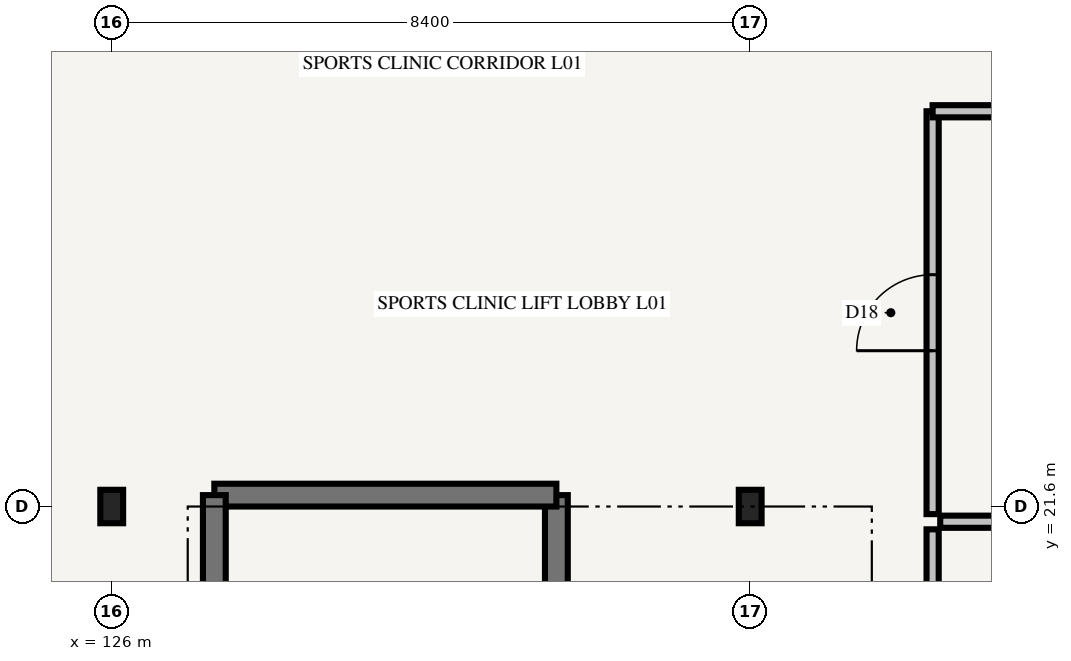
"""IFC4 building model, lengths in metres.
Left out: names, types, materials, properties, quantities, classifications, styles, units other than length and angle.
Written with IfcOpenShell. Run it as: python <this file> out.ifc"""

import sys

from ifc_helpers import new_model, si_unit, direction, frame, frame_2d, origin, origin_2d, place, context, subcontext, project, spatial, rectangle, i_section, extrude, element, fill, save


model = new_model("IFC4")
c1 = context("Model", 3, precision=1e-05, world=origin(), true_north=direction((0.0, 1.0)))
c2 = subcontext(c1, "Body", "Model", "MODEL_VIEW")
j1 = project(units=[si_unit("LENGTHUNIT", "METRE"), si_unit("PLANEANGLEUNIT", "RADIAN")], contexts=[c1])
p1 = place(None, origin())
s1 = spatial("IfcSite", under=j1, at=p1, CompositionType="ELEMENT")
p2 = place(p1, origin())
s2 = spatial("IfcBuilding", under=s1, at=p2, CompositionType="ELEMENT")
p3 = place(p2, frame((0.0, 0.0, 4.5)))
s3 = spatial("IfcBuildingStorey", under=s2, at=p3, CompositionType="ELEMENT", Elevation=4.5)
for number, where, z_axis, x_axis in (
    (1, (126.0, 21.6, 0.0), (0.0, 0.0, 1.0), (1.0, 0.0, 0.0)),
    (2, (134.4, 21.6, 0.0), (0.0, 0.0, 1.0), (1.0, 0.0, 0.0)),
):
    element("IfcColumn", number, at=place(p3, frame(where, z_axis=z_axis, x_axis=x_axis)), inside=s3, PredefinedType="COLUMN", context=c2, shape_type="SweptSolid", body=[
        extrude(i_section(OverallWidth=0.3, OverallDepth=0.44, WebThickness=0.011, FlangeThickness=0.021, FilletRadius=0.027, at=origin_2d()), origin(), (0.0, 0.0, 1.0), 4.2),
    ])
p4 = place(p3, frame((131.85, 14.65, 0.0), z_axis=(0.0, 0.0, 1.0), x_axis=(0.0, 1.0, 0.0)))
e3 = element("IfcWall", 3, at=p4, inside=s3, PredefinedType="SHEAR", context=c2, shape_type="SweptSolid", body=[
    extrude(rectangle(XDim=7.1, YDim=0.3, at=frame_2d((3.55, 0.0))), origin(), (0.0, 0.0, 1.0), 4.0),
])
p5 = place(p3, frame((131.85, 21.75, 0.0), z_axis=(0.0, 0.0, 1.0), x_axis=(-1.0, 0.0, 0.0)))
e4 = element("IfcWall", 4, at=p5, inside=s3, PredefinedType="SHEAR", context=c2, shape_type="SweptSolid", body=[
    extrude(rectangle(XDim=4.5, YDim=0.3, at=frame_2d((2.25, 0.0))), origin(), (0.0, 0.0, 1.0), 4.0),
])
p6 = place(p3, frame((127.35, 21.75, 0.0), z_axis=(0.0, 0.0, 1.0), x_axis=(0.0, -1.0, 0.0)))
e5 = element("IfcWall", 5, at=p6, inside=s3, PredefinedType="SHEAR", context=c2, shape_type="SweptSolid", body=[
    extrude(rectangle(XDim=7.1, YDim=0.3, at=frame_2d((3.55, 0.0))), origin(), (0.0, 0.0, 1.0), 4.0),
])
p7 = place(p3, frame((136.8, 14.5, 0.0), z_axis=(0.0, 0.0, 1.0), x_axis=(0.0, 1.0, 0.0)))
e6 = element("IfcWall", 6, at=p7, inside=s3, PredefinedType="PARTITIONING", context=c2, shape_type="SweptSolid", body=[
    extrude(rectangle(XDim=6.8, YDim=0.16, at=frame_2d((3.4, 0.0))), origin(), (0.0, 0.0, 1.0), 3.32),
])
p8 = place(p7, frame((2.925, 0.0, 0.0)))
e7 = element("IfcOpeningElement", 7, at=p8, cuts=e6, PredefinedType="OPENING", context=c2, shape_type="SweptSolid", body=[
    extrude(rectangle(XDim=0.95, YDim=2.15, at=frame_2d((0.475, 1.075))), frame((0.0, 0.105, 0.0), z_axis=(0.0, -1.0, 0.0), x_axis=(1.0, 0.0, 0.0)), (0.0, 0.0, 1.0), 0.21),
])
p9 = place(p3, frame((136.8, 21.5, 0.0), z_axis=(0.0, 0.0, 1.0), x_axis=(0.0, 1.0, 0.0)))
e8 = element("IfcWall", 8, at=p9, inside=s3, PredefinedType="PARTITIONING", context=c2, shape_type="SweptSolid", body=[
    extrude(rectangle(XDim=5.3, YDim=0.16, at=frame_2d((2.65, 0.0))), origin(), (0.0, 0.0, 1.0), 3.32),
])
p10 = place(p9, frame((2.15, 0.0, 0.0)))
e9 = element("IfcOpeningElement", 9, at=p10, cuts=e8, PredefinedType="OPENING", context=c2, shape_type="SweptSolid", body=[
    extrude(rectangle(XDim=1.0, YDim=2.15, at=frame_2d((0.5, 1.075))), frame((0.0, 0.105, 0.0), z_axis=(0.0, -1.0, 0.0), x_axis=(1.0, 0.0, 0.0)), (0.0, 0.0, 1.0), 0.21),
])
p11 = place(p3, frame((136.9, 21.4, 0.0), z_axis=(0.0, 0.0, 1.0), x_axis=(1.0, 0.0, 0.0)))
e10 = element("IfcWall", 10, at=p11, inside=s3, PredefinedType="PARTITIONING", context=c2, shape_type="SweptSolid", body=[
    extrude(rectangle(XDim=5.9, YDim=0.16, at=frame_2d((2.95, 0.0))), origin(), (0.0, 0.0, 1.0), 3.32),
])
p12 = place(p3, frame((136.8, 26.8, 0.0), z_axis=(0.0, 0.0, 1.0), x_axis=(1.0, 0.0, 0.0)))
e11 = element("IfcWall", 11, at=p12, inside=s3, PredefinedType="PARTITIONING", context=c2, shape_type="SweptSolid", body=[
    extrude(rectangle(XDim=6.0, YDim=0.16, at=frame_2d((3.0, 0.0))), origin(), (0.0, 0.0, 1.0), 3.32),
])
p13 = place(p10, origin())
e12 = element("IfcDoor", 12, at=p13, inside=s3, OperationType="SINGLE_SWING_LEFT", PredefinedType="DOOR", context=c2, shape_type="SweptSolid", body=[
    extrude(rectangle(XDim=1.0, YDim=2.15, at=frame_2d((0.5, 1.075))), frame((0.0, 0.025, 0.0), z_axis=(0.0, -1.0, 0.0), x_axis=(1.0, 0.0, 0.0)), (0.0, 0.0, 1.0), 0.05),
])
fill(e9, e12)
save(model, sys.argv[1])
